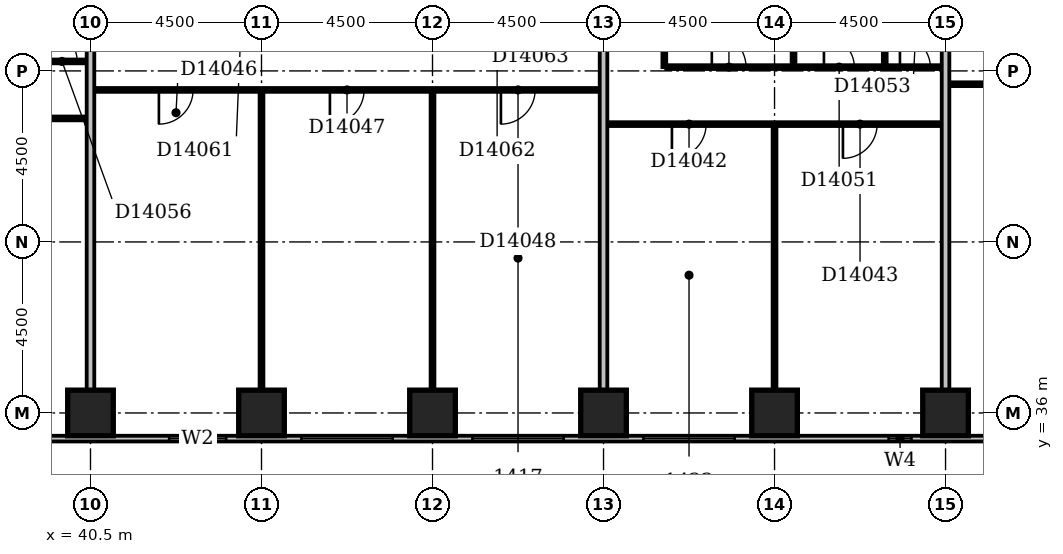
"""IFC4 building model, lengths in metres.
Left out: names, types, materials, properties, quantities, classifications, styles, units other than length and angle.
Written with IfcOpenShell. Run it as: python <this file> out.ifc"""

import sys

from ifc_helpers import new_model, si_unit, direction, frame, frame_2d, origin, origin_2d, place, context, subcontext, project, spatial, rectangle, extrude, element, fill, save


model = new_model("IFC4")
c1 = context("Model", 3, precision=1e-05, world=origin(), true_north=direction((0.0, 1.0)))
c2 = subcontext(c1, "Body", "Model", "MODEL_VIEW")
j1 = project(units=[si_unit("LENGTHUNIT", "METRE"), si_unit("PLANEANGLEUNIT", "RADIAN")], contexts=[c1])
p1 = place(None, origin())
s1 = spatial("IfcSite", under=j1, at=p1, CompositionType="ELEMENT")
p2 = place(p1, origin())
s2 = spatial("IfcBuilding", under=s1, at=p2, CompositionType="ELEMENT")
p3 = place(p2, frame((0.0, 0.0, 61.4)))
s3 = spatial("IfcBuildingStorey", under=s2, at=p3, CompositionType="ELEMENT", Elevation=61.4)
for number, where, z_axis, x_axis in (
    (1, (40.5, 36.0, -0.3), (0.0, 0.0, 1.0), (1.0, 0.0, 0.0)),
    (2, (45.0, 36.0, -0.3), (0.0, 0.0, 1.0), (1.0, 0.0, 0.0)),
    (3, (49.5, 36.0, -0.3), (0.0, 0.0, 1.0), (1.0, 0.0, 0.0)),
    (4, (54.0, 36.0, -0.3), (0.0, 0.0, 1.0), (1.0, 0.0, 0.0)),
    (5, (58.5, 36.0, -0.3), (0.0, 0.0, 1.0), (1.0, 0.0, 0.0)),
    (6, (63.0, 36.0, -0.3), (0.0, 0.0, 1.0), (1.0, 0.0, 0.0)),
):
    element("IfcColumn", number, at=place(p3, frame(where, z_axis=z_axis, x_axis=x_axis)), inside=s3, PredefinedType="COLUMN", context=c2, shape_type="SweptSolid", body=[
        extrude(rectangle(XDim=1.2, YDim=1.2, at=origin_2d()), origin(), (0.0, 0.0, 1.0), 3.6),
    ])
p4 = place(p3, frame((23.1, 35.325, 0.0), z_axis=(0.0, 0.0, 1.0), x_axis=(1.0, 0.0, 0.0)))
e7 = element("IfcWall", 7, at=p4, inside=s3, PredefinedType="STANDARD", context=c2, shape_type="SweptSolid", body=[
    extrude(rectangle(XDim=45.15, YDim=0.15, at=frame_2d((22.575, 0.0))), origin(), (0.0, 0.0, 1.0), 2.7),
])
p5 = place(p4, frame((0.45, 0.0, 0.6)))
e8 = element("IfcOpeningElement", 8, at=p5, cuts=e7, PredefinedType="OPENING", context=c2, shape_type="SweptSolid", body=[
    extrude(rectangle(XDim=2.4, YDim=1.8, at=frame_2d((1.2, 0.9))), frame((0.0, 0.087, 0.0), z_axis=(0.0, -1.0, 0.0), x_axis=(1.0, 0.0, 0.0)), (0.0, 0.0, 1.0), 0.174),
])
p6 = place(p4, frame((4.77, 0.0, 0.6)))
e9 = element("IfcOpeningElement", 9, at=p6, cuts=e7, PredefinedType="OPENING", context=c2, shape_type="SweptSolid", body=[
    extrude(rectangle(XDim=2.1, YDim=1.8, at=frame_2d((1.05, 0.9))), frame((0.0, 0.087, 0.0), z_axis=(0.0, -1.0, 0.0), x_axis=(1.0, 0.0, 0.0)), (0.0, 0.0, 1.0), 0.174),
])
p7 = place(p4, frame((9.45, 0.0, 0.6)))
e10 = element("IfcOpeningElement", 10, at=p7, cuts=e7, PredefinedType="OPENING", context=c2, shape_type="SweptSolid", body=[
    extrude(rectangle(XDim=2.4, YDim=1.8, at=frame_2d((1.2, 0.9))), frame((0.0, 0.087, 0.0), z_axis=(0.0, -1.0, 0.0), x_axis=(1.0, 0.0, 0.0)), (0.0, 0.0, 1.0), 0.174),
])
p8 = place(p4, frame((13.95, 0.0, 0.6)))
e11 = element("IfcOpeningElement", 11, at=p8, cuts=e7, PredefinedType="OPENING", context=c2, shape_type="SweptSolid", body=[
    extrude(rectangle(XDim=2.4, YDim=1.8, at=frame_2d((1.2, 0.9))), frame((0.0, 0.087, 0.0), z_axis=(0.0, -1.0, 0.0), x_axis=(1.0, 0.0, 0.0)), (0.0, 0.0, 1.0), 0.174),
])
p9 = place(p4, frame((19.47, 0.0, 0.6)))
e12 = element("IfcOpeningElement", 12, at=p9, cuts=e7, PredefinedType="OPENING", context=c2, shape_type="SweptSolid", body=[
    extrude(rectangle(XDim=1.5, YDim=1.8, at=frame_2d((0.75, 0.9))), frame((0.0, 0.087, 0.0), z_axis=(0.0, -1.0, 0.0), x_axis=(1.0, 0.0, 0.0)), (0.0, 0.0, 1.0), 0.174),
])
p10 = place(p4, frame((22.95, 0.0, 0.6)))
e13 = element("IfcOpeningElement", 13, at=p10, cuts=e7, PredefinedType="OPENING", context=c2, shape_type="SweptSolid", body=[
    extrude(rectangle(XDim=2.4, YDim=1.8, at=frame_2d((1.2, 0.9))), frame((0.0, 0.087, 0.0), z_axis=(0.0, -1.0, 0.0), x_axis=(1.0, 0.0, 0.0)), (0.0, 0.0, 1.0), 0.174),
])
p11 = place(p4, frame((27.45, 0.0, 0.6)))
e14 = element("IfcOpeningElement", 14, at=p11, cuts=e7, PredefinedType="OPENING", context=c2, shape_type="SweptSolid", body=[
    extrude(rectangle(XDim=2.4, YDim=1.8, at=frame_2d((1.2, 0.9))), frame((0.0, 0.087, 0.0), z_axis=(0.0, -1.0, 0.0), x_axis=(1.0, 0.0, 0.0)), (0.0, 0.0, 1.0), 0.174),
])
p12 = place(p4, frame((31.95, 0.0, 0.6)))
e15 = element("IfcOpeningElement", 15, at=p12, cuts=e7, PredefinedType="OPENING", context=c2, shape_type="SweptSolid", body=[
    extrude(rectangle(XDim=2.4, YDim=1.8, at=frame_2d((1.2, 0.9))), frame((0.0, 0.087, 0.0), z_axis=(0.0, -1.0, 0.0), x_axis=(1.0, 0.0, 0.0)), (0.0, 0.0, 1.0), 0.174),
])
p13 = place(p4, frame((38.403, 0.0, 0.6)))
e16 = element("IfcOpeningElement", 16, at=p13, cuts=e7, PredefinedType="OPENING", context=c2, shape_type="SweptSolid", body=[
    extrude(rectangle(XDim=0.6, YDim=1.8, at=frame_2d((0.3, 0.9))), frame((0.0, 0.087, 0.0), z_axis=(0.0, -1.0, 0.0), x_axis=(1.0, 0.0, 0.0)), (0.0, 0.0, 1.0), 0.174),
])
p14 = place(p4, frame((40.95, 0.0, 0.6)))
e17 = element("IfcOpeningElement", 17, at=p14, cuts=e7, PredefinedType="OPENING", context=c2, shape_type="SweptSolid", body=[
    extrude(rectangle(XDim=2.4, YDim=1.8, at=frame_2d((1.2, 0.9))), frame((0.0, 0.087, 0.0), z_axis=(0.0, -1.0, 0.0), x_axis=(1.0, 0.0, 0.0)), (0.0, 0.0, 1.0), 0.174),
])
p15 = place(p3, frame((40.5, 36.6, 0.0), z_axis=(0.0, 0.0, 1.0), x_axis=(0.0, 1.0, 0.0)))
e18 = element("IfcWall", 18, at=p15, inside=s3, PredefinedType="PARTITIONING", context=c2, shape_type="SweptSolid", body=[
    extrude(rectangle(XDim=12.8, YDim=0.2, at=frame_2d((6.4, 0.0))), origin(), (0.0, 0.0, 1.0), 3.3),
])
p16 = place(p3, frame((45.0, 36.6, 0.0), z_axis=(0.0, 0.0, 1.0), x_axis=(0.0, 1.0, 0.0)))
e19 = element("IfcWall", 19, at=p16, inside=s3, PredefinedType="PARTITIONING", context=c2, shape_type="SweptSolid", body=[
    extrude(rectangle(XDim=7.85, YDim=0.1, at=frame_2d((3.925, 0.0))), origin(), (0.0, 0.0, 1.0), 2.6),
])
p17 = place(p3, frame((49.5, 36.6, 0.0), z_axis=(0.0, 0.0, 1.0), x_axis=(0.0, 1.0, 0.0)))
e20 = element("IfcWall", 20, at=p17, inside=s3, PredefinedType="PARTITIONING", context=c2, shape_type="SweptSolid", body=[
    extrude(rectangle(XDim=7.85, YDim=0.1, at=frame_2d((3.925, 0.0))), origin(), (0.0, 0.0, 1.0), 3.3),
])
p18 = place(p3, frame((54.0, 36.6, 0.0), z_axis=(0.0, 0.0, 1.0), x_axis=(0.0, 1.0, 0.0)))
e21 = element("IfcWall", 21, at=p18, inside=s3, PredefinedType="PARTITIONING", context=c2, shape_type="SweptSolid", body=[
    extrude(rectangle(XDim=12.8, YDim=0.2, at=frame_2d((6.4, 0.0))), origin(), (0.0, 0.0, 1.0), 2.6),
])
p19 = place(p3, frame((58.5, 36.6, 0.0), z_axis=(0.0, 0.0, 1.0), x_axis=(0.0, 1.0, 0.0)))
e22 = element("IfcWall", 22, at=p19, inside=s3, PredefinedType="PARTITIONING", context=c2, shape_type="SweptSolid", body=[
    extrude(rectangle(XDim=6.95, YDim=0.1, at=frame_2d((3.475, 0.0))), origin(), (0.0, 0.0, 1.0), 3.3),
])
p20 = place(p3, frame((63.0, 36.6, 0.0), z_axis=(0.0, 0.0, 1.0), x_axis=(0.0, 1.0, 0.0)))
e23 = element("IfcWall", 23, at=p20, inside=s3, PredefinedType="PARTITIONING", context=c2, shape_type="SweptSolid", body=[
    extrude(rectangle(XDim=12.8, YDim=0.2, at=frame_2d((6.4, 0.0))), origin(), (0.0, 0.0, 1.0), 2.4),
])
p21 = place(p3, frame((54.1, 43.6, 0.0), z_axis=(0.0, 0.0, 1.0), x_axis=(1.0, 0.0, 0.0)))
e24 = element("IfcWall", 24, at=p21, inside=s3, PredefinedType="PARTITIONING", context=c2, shape_type="SweptSolid", body=[
    extrude(rectangle(XDim=8.8, YDim=0.1, at=frame_2d((4.4, 0.0))), origin(), (0.0, 0.0, 1.0), 3.3),
])
p22 = place(p21, frame((1.7, 0.0, 0.0)))
e25 = element("IfcOpeningElement", 25, at=p22, cuts=e24, PredefinedType="OPENING", context=c2, shape_type="SweptSolid", body=[
    extrude(rectangle(XDim=0.9, YDim=2.1, at=frame_2d((0.45, 1.05))), frame((0.0, 0.062, 0.0), z_axis=(0.0, -1.0, 0.0), x_axis=(1.0, 0.0, 0.0)), (0.0, 0.0, 1.0), 0.124),
])
p23 = place(p21, frame((6.2, 0.0, 0.0)))
e26 = element("IfcOpeningElement", 26, at=p23, cuts=e24, PredefinedType="OPENING", context=c2, shape_type="SweptSolid", body=[
    extrude(rectangle(XDim=0.9, YDim=2.1, at=frame_2d((0.45, 1.05))), frame((0.0, 0.062, 0.0), z_axis=(0.0, -1.0, 0.0), x_axis=(1.0, 0.0, 0.0)), (0.0, 0.0, 1.0), 0.124),
])
p24 = place(p3, frame((27.1, 43.75, 0.0), z_axis=(0.0, 0.0, 1.0), x_axis=(1.0, 0.0, 0.0)))
e27 = element("IfcWall", 27, at=p24, inside=s3, PredefinedType="PARTITIONING", context=c2, shape_type="SweptSolid", body=[
    extrude(rectangle(XDim=13.3, YDim=0.1, at=frame_2d((6.65, 0.0))), origin(), (0.0, 0.0, 1.0), 3.3),
])
p25 = place(p24, frame((3.9, 0.0, 0.0)))
e28 = element("IfcOpeningElement", 28, at=p25, cuts=e27, PredefinedType="OPENING", context=c2, shape_type="SweptSolid", body=[
    extrude(rectangle(XDim=0.9, YDim=2.1, at=frame_2d((0.45, 1.05))), frame((0.0, 0.062, 0.0), z_axis=(0.0, -1.0, 0.0), x_axis=(1.0, 0.0, 0.0)), (0.0, 0.0, 1.0), 0.124),
])
p26 = place(p24, frame((10.7, 0.0, 0.0)))
e29 = element("IfcOpeningElement", 29, at=p26, cuts=e27, PredefinedType="OPENING", context=c2, shape_type="SweptSolid", body=[
    extrude(rectangle(XDim=0.9, YDim=2.1, at=frame_2d((0.45, 1.05))), frame((0.0, 0.062, 0.0), z_axis=(0.0, -1.0, 0.0), x_axis=(1.0, 0.0, 0.0)), (0.0, 0.0, 1.0), 0.124),
])
p27 = place(p3, frame((40.6, 44.5, 0.0), z_axis=(0.0, 0.0, 1.0), x_axis=(1.0, 0.0, 0.0)))
e30 = element("IfcWall", 30, at=p27, inside=s3, PredefinedType="PARTITIONING", context=c2, shape_type="SweptSolid", body=[
    extrude(rectangle(XDim=13.3, YDim=0.1, at=frame_2d((6.65, 0.0))), origin(), (0.0, 0.0, 1.0), 3.3),
])
p28 = place(p27, frame((1.7, 0.0, 0.0)))
e31 = element("IfcOpeningElement", 31, at=p28, cuts=e30, PredefinedType="OPENING", context=c2, shape_type="SweptSolid", body=[
    extrude(rectangle(XDim=0.9, YDim=2.1, at=frame_2d((0.45, 1.05))), frame((0.0, 0.062, 0.0), z_axis=(0.0, -1.0, 0.0), x_axis=(1.0, 0.0, 0.0)), (0.0, 0.0, 1.0), 0.124),
])
p29 = place(p27, frame((6.2, 0.0, 0.0)))
e32 = element("IfcOpeningElement", 32, at=p29, cuts=e30, PredefinedType="OPENING", context=c2, shape_type="SweptSolid", body=[
    extrude(rectangle(XDim=0.9, YDim=2.1, at=frame_2d((0.45, 1.05))), frame((0.0, 0.062, 0.0), z_axis=(0.0, -1.0, 0.0), x_axis=(1.0, 0.0, 0.0)), (0.0, 0.0, 1.0), 0.124),
])
p30 = place(p27, frame((10.7, 0.0, 0.0)))
e33 = element("IfcOpeningElement", 33, at=p30, cuts=e30, PredefinedType="OPENING", context=c2, shape_type="SweptSolid", body=[
    extrude(rectangle(XDim=0.9, YDim=2.1, at=frame_2d((0.45, 1.05))), frame((0.0, 0.062, 0.0), z_axis=(0.0, -1.0, 0.0), x_axis=(1.0, 0.0, 0.0)), (0.0, 0.0, 1.0), 0.124),
])
p31 = place(p3, frame((63.1, 44.65, 0.0), z_axis=(0.0, 0.0, 1.0), x_axis=(1.0, 0.0, 0.0)))
e34 = element("IfcWall", 34, at=p31, inside=s3, PredefinedType="PARTITIONING", context=c2, shape_type="SweptSolid", body=[
    extrude(rectangle(XDim=3.8, YDim=0.1, at=frame_2d((1.9, 0.0))), origin(), (0.0, 0.0, 1.0), 3.3),
])
p32 = place(p31, frame((1.7, 0.0, 0.0)))
e35 = element("IfcOpeningElement", 35, at=p32, cuts=e34, PredefinedType="OPENING", context=c2, shape_type="SweptSolid", body=[
    extrude(rectangle(XDim=0.9, YDim=2.1, at=frame_2d((0.45, 1.05))), frame((0.0, 0.062, 0.0), z_axis=(0.0, -1.0, 0.0), x_axis=(1.0, 0.0, 0.0)), (0.0, 0.0, 1.0), 0.124),
])
p33 = place(p3, frame((55.6, 45.1, 0.0), z_axis=(0.0, 0.0, 1.0), x_axis=(0.0, 1.0, 0.0)))
e36 = element("IfcWall", 36, at=p33, inside=s3, PredefinedType="PARTITIONING", context=c2, shape_type="SweptSolid", body=[
    extrude(rectangle(XDim=4.3, YDim=0.1, at=frame_2d((2.15, 0.0))), origin(), (0.0, 0.0, 1.0), 3.3),
])
p34 = place(p3, frame((55.65, 45.1, 0.0), z_axis=(0.0, 0.0, 1.0), x_axis=(1.0, 0.0, 0.0)))
e37 = element("IfcWall", 37, at=p34, inside=s3, PredefinedType="PARTITIONING", context=c2, shape_type="SweptSolid", body=[
    extrude(rectangle(XDim=7.25, YDim=0.1, at=frame_2d((3.625, 0.0))), origin(), (0.0, 0.0, 1.0), 3.3),
])
p35 = place(p34, frame((4.15, 0.0, 0.0)))
e38 = element("IfcOpeningElement", 38, at=p35, cuts=e37, PredefinedType="OPENING", context=c2, shape_type="SweptSolid", body=[
    extrude(rectangle(XDim=0.8, YDim=2.1, at=frame_2d((0.4, 1.05))), frame((0.0, 0.062, 0.0), z_axis=(0.0, -1.0, 0.0), x_axis=(1.0, 0.0, 0.0)), (0.0, 0.0, 1.0), 0.124),
])
p36 = place(p34, frame((1.2, 0.0, 0.0)))
e39 = element("IfcOpeningElement", 39, at=p36, cuts=e37, PredefinedType="OPENING", context=c2, shape_type="SweptSolid", body=[
    extrude(rectangle(XDim=0.9, YDim=2.1, at=frame_2d((0.45, 1.05))), frame((0.0, 0.062, 0.0), z_axis=(0.0, -1.0, 0.0), x_axis=(1.0, 0.0, 0.0)), (0.0, 0.0, 1.0), 0.124),
])
p37 = place(p34, frame((6.15, 0.0, 0.0)))
e40 = element("IfcOpeningElement", 40, at=p37, cuts=e37, PredefinedType="OPENING", context=c2, shape_type="SweptSolid", body=[
    extrude(rectangle(XDim=0.8, YDim=2.1, at=frame_2d((0.4, 1.05))), frame((0.0, 0.062, 0.0), z_axis=(0.0, -1.0, 0.0), x_axis=(1.0, 0.0, 0.0)), (0.0, 0.0, 1.0), 0.124),
])
for number, where, z_axis, x_axis in (
    (41, (59.0, 45.15, 0.0), (0.0, 0.0, 1.0), (0.0, 1.0, 0.0)),
    (42, (61.4, 45.15, 0.0), (0.0, 0.0, 1.0), (0.0, 1.0, 0.0)),
):
    element("IfcWall", number, at=place(p3, frame(where, z_axis=z_axis, x_axis=x_axis)), inside=s3, PredefinedType="PLUMBINGWALL", context=c2, shape_type="SweptSolid", body=[
        extrude(rectangle(XDim=4.25, YDim=0.1, at=frame_2d((2.125, 0.0))), origin(), (0.0, 0.0, 1.0), 3.3),
    ])
p38 = place(p3, frame((28.65, 45.25, 0.0), z_axis=(0.0, 0.0, 1.0), x_axis=(1.0, 0.0, 0.0)))
e43 = element("IfcWall", 43, at=p38, inside=s3, PredefinedType="PARTITIONING", context=c2, shape_type="SweptSolid", body=[
    extrude(rectangle(XDim=11.75, YDim=0.1, at=frame_2d((5.875, 0.0))), origin(), (0.0, 0.0, 1.0), 3.3),
])
p39 = place(p38, frame((8.75, 0.0, 0.0)))
e44 = element("IfcOpeningElement", 44, at=p39, cuts=e43, PredefinedType="OPENING", context=c2, shape_type="SweptSolid", body=[
    extrude(rectangle(XDim=0.8, YDim=2.1, at=frame_2d((0.4, 1.05))), frame((0.0, 0.062, 0.0), z_axis=(0.0, -1.0, 0.0), x_axis=(1.0, 0.0, 0.0)), (0.0, 0.0, 1.0), 0.124),
])
p40 = place(p38, frame((3.5, 0.0, 0.0)))
e45 = element("IfcOpeningElement", 45, at=p40, cuts=e43, PredefinedType="OPENING", context=c2, shape_type="SweptSolid", body=[
    extrude(rectangle(XDim=0.9, YDim=2.1, at=frame_2d((0.45, 1.05))), frame((0.0, 0.062, 0.0), z_axis=(0.0, -1.0, 0.0), x_axis=(1.0, 0.0, 0.0)), (0.0, 0.0, 1.0), 0.124),
])
p41 = place(p38, frame((10.7, 0.0, 0.0)))
e46 = element("IfcOpeningElement", 46, at=p41, cuts=e43, PredefinedType="OPENING", context=c2, shape_type="SweptSolid", body=[
    extrude(rectangle(XDim=0.8, YDim=2.1, at=frame_2d((0.4, 1.05))), frame((0.0, 0.062, 0.0), z_axis=(0.0, -1.0, 0.0), x_axis=(1.0, 0.0, 0.0)), (0.0, 0.0, 1.0), 0.124),
])
p42 = place(p9, origin())
e47 = element("IfcWindow", 47, at=p42, inside=s3, PartitioningType="SINGLE_PANEL", PredefinedType="WINDOW", context=c2, shape_type="SweptSolid", body=[
    extrude(rectangle(XDim=1.5, YDim=1.8, at=frame_2d((0.75, 0.9))), frame((0.0, 0.03, 0.0), z_axis=(0.0, -1.0, 0.0), x_axis=(1.0, 0.0, 0.0)), (0.0, 0.0, 1.0), 0.06),
])
fill(e12, e47)
p43 = place(p10, origin())
e48 = element("IfcWindow", 48, at=p43, inside=s3, PartitioningType="SINGLE_PANEL", PredefinedType="WINDOW", context=c2, shape_type="SweptSolid", body=[
    extrude(rectangle(XDim=2.4, YDim=1.8, at=frame_2d((1.2, 0.9))), frame((0.0, 0.03, 0.0), z_axis=(0.0, -1.0, 0.0), x_axis=(1.0, 0.0, 0.0)), (0.0, 0.0, 1.0), 0.06),
])
fill(e13, e48)
p44 = place(p11, origin())
e49 = element("IfcWindow", 49, at=p44, inside=s3, PartitioningType="SINGLE_PANEL", PredefinedType="WINDOW", context=c2, shape_type="SweptSolid", body=[
    extrude(rectangle(XDim=2.4, YDim=1.8, at=frame_2d((1.2, 0.9))), frame((0.0, 0.03, 0.0), z_axis=(0.0, -1.0, 0.0), x_axis=(1.0, 0.0, 0.0)), (0.0, 0.0, 1.0), 0.06),
])
fill(e14, e49)
p45 = place(p12, origin())
e50 = element("IfcWindow", 50, at=p45, inside=s3, PartitioningType="SINGLE_PANEL", PredefinedType="WINDOW", context=c2, shape_type="SweptSolid", body=[
    extrude(rectangle(XDim=2.4, YDim=1.8, at=frame_2d((1.2, 0.9))), frame((0.0, 0.03, 0.0), z_axis=(0.0, -1.0, 0.0), x_axis=(1.0, 0.0, 0.0)), (0.0, 0.0, 1.0), 0.06),
])
fill(e15, e50)
p46 = place(p13, origin())
e51 = element("IfcWindow", 51, at=p46, inside=s3, PartitioningType="SINGLE_PANEL", PredefinedType="WINDOW", context=c2, shape_type="SweptSolid", body=[
    extrude(rectangle(XDim=0.6, YDim=1.8, at=frame_2d((0.3, 0.9))), frame((0.0, 0.03, 0.0), z_axis=(0.0, -1.0, 0.0), x_axis=(1.0, 0.0, 0.0)), (0.0, 0.0, 1.0), 0.06),
])
fill(e16, e51)
p47 = place(p22, frame((0.9, 0.0, 0.0), z_axis=(0.0, 0.0, 1.0), x_axis=(-1.0, 0.0, 0.0)))
e52 = element("IfcDoor", 52, at=p47, inside=s3, OperationType="SINGLE_SWING_RIGHT", PredefinedType="DOOR", context=c2, shape_type="SweptSolid", body=[
    extrude(rectangle(XDim=0.9, YDim=2.1, at=frame_2d((0.45, 1.05))), frame((0.0, 0.025, 0.0), z_axis=(0.0, -1.0, 0.0), x_axis=(1.0, 0.0, 0.0)), (0.0, 0.0, 1.0), 0.05),
])
fill(e25, e52)
p48 = place(p23, frame((0.9, 0.0, 0.0), z_axis=(0.0, 0.0, 1.0), x_axis=(-1.0, 0.0, 0.0)))
e53 = element("IfcDoor", 53, at=p48, inside=s3, OperationType="SINGLE_SWING_RIGHT", PredefinedType="DOOR", context=c2, shape_type="SweptSolid", body=[
    extrude(rectangle(XDim=0.9, YDim=2.1, at=frame_2d((0.45, 1.05))), frame((0.0, 0.025, 0.0), z_axis=(0.0, -1.0, 0.0), x_axis=(1.0, 0.0, 0.0)), (0.0, 0.0, 1.0), 0.05),
])
fill(e26, e53)
p49 = place(p28, frame((0.9, 0.0, 0.0), z_axis=(0.0, 0.0, 1.0), x_axis=(-1.0, 0.0, 0.0)))
e54 = element("IfcDoor", 54, at=p49, inside=s3, OperationType="SINGLE_SWING_RIGHT", PredefinedType="DOOR", context=c2, shape_type="SweptSolid", body=[
    extrude(rectangle(XDim=0.9, YDim=2.1, at=frame_2d((0.45, 1.05))), frame((0.0, 0.025, 0.0), z_axis=(0.0, -1.0, 0.0), x_axis=(1.0, 0.0, 0.0)), (0.0, 0.0, 1.0), 0.05),
])
fill(e31, e54)
p50 = place(p29, frame((0.9, 0.0, 0.0), z_axis=(0.0, 0.0, 1.0), x_axis=(-1.0, 0.0, 0.0)))
e55 = element("IfcDoor", 55, at=p50, inside=s3, OperationType="SINGLE_SWING_RIGHT", PredefinedType="DOOR", context=c2, shape_type="SweptSolid", body=[
    extrude(rectangle(XDim=0.9, YDim=2.1, at=frame_2d((0.45, 1.05))), frame((0.0, 0.025, 0.0), z_axis=(0.0, -1.0, 0.0), x_axis=(1.0, 0.0, 0.0)), (0.0, 0.0, 1.0), 0.05),
])
fill(e32, e55)
p51 = place(p30, frame((0.9, 0.0, 0.0), z_axis=(0.0, 0.0, 1.0), x_axis=(-1.0, 0.0, 0.0)))
e56 = element("IfcDoor", 56, at=p51, inside=s3, OperationType="SINGLE_SWING_RIGHT", PredefinedType="DOOR", context=c2, shape_type="SweptSolid", body=[
    extrude(rectangle(XDim=0.9, YDim=2.1, at=frame_2d((0.45, 1.05))), frame((0.0, 0.025, 0.0), z_axis=(0.0, -1.0, 0.0), x_axis=(1.0, 0.0, 0.0)), (0.0, 0.0, 1.0), 0.05),
])
fill(e33, e56)
p52 = place(p35, origin())
e57 = element("IfcDoor", 57, at=p52, inside=s3, OperationType="SINGLE_SWING_LEFT", PredefinedType="DOOR", context=c2, shape_type="SweptSolid", body=[
    extrude(rectangle(XDim=0.8, YDim=2.1, at=frame_2d((0.4, 1.05))), frame((0.0, 0.025, 0.0), z_axis=(0.0, -1.0, 0.0), x_axis=(1.0, 0.0, 0.0)), (0.0, 0.0, 1.0), 0.05),
])
fill(e38, e57)
p53 = place(p36, origin())
e58 = element("IfcDoor", 58, at=p53, inside=s3, OperationType="SINGLE_SWING_LEFT", PredefinedType="DOOR", context=c2, shape_type="SweptSolid", body=[
    extrude(rectangle(XDim=0.9, YDim=2.1, at=frame_2d((0.45, 1.05))), frame((0.0, 0.025, 0.0), z_axis=(0.0, -1.0, 0.0), x_axis=(1.0, 0.0, 0.0)), (0.0, 0.0, 1.0), 0.05),
])
fill(e39, e58)
p54 = place(p37, origin())
e59 = element("IfcDoor", 59, at=p54, inside=s3, OperationType="SINGLE_SWING_LEFT", PredefinedType="DOOR", context=c2, shape_type="SweptSolid", body=[
    extrude(rectangle(XDim=0.8, YDim=2.1, at=frame_2d((0.4, 1.05))), frame((0.0, 0.025, 0.0), z_axis=(0.0, -1.0, 0.0), x_axis=(1.0, 0.0, 0.0)), (0.0, 0.0, 1.0), 0.05),
])
fill(e40, e59)
p55 = place(p41, origin())
e60 = element("IfcDoor", 60, at=p55, inside=s3, OperationType="SINGLE_SWING_LEFT", PredefinedType="DOOR", context=c2, shape_type="SweptSolid", body=[
    extrude(rectangle(XDim=0.8, YDim=2.1, at=frame_2d((0.4, 1.05))), frame((0.0, 0.025, 0.0), z_axis=(0.0, -1.0, 0.0), x_axis=(1.0, 0.0, 0.0)), (0.0, 0.0, 1.0), 0.05),
])
fill(e46, e60)
save(model, sys.argv[1])
